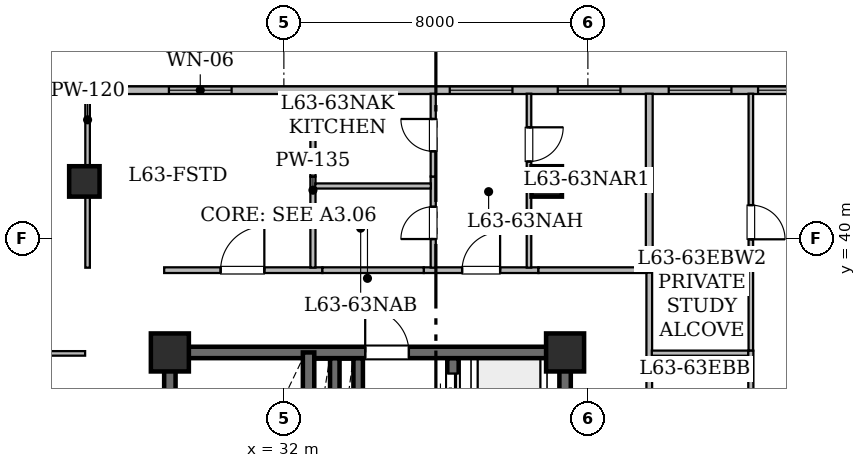
"""IFC4 building model, lengths in metres.
Left out: names, types, materials, properties, quantities, classifications, styles, units other than length and angle.
Written with IfcOpenShell. Run it as: python <this file> out.ifc"""

import sys

from ifc_helpers import new_model, si_unit, direction, frame, frame_2d, origin, origin_2d, place, context, subcontext, project, spatial, rectangle, hollow_rectangle, extrude, element, fill, save


model = new_model("IFC4")
c1 = context("Model", 3, precision=1e-05, world=origin(), true_north=direction((0.0, 1.0)))
c2 = subcontext(c1, "Body", "Model", "MODEL_VIEW")
j1 = project(units=[si_unit("LENGTHUNIT", "METRE"), si_unit("PLANEANGLEUNIT", "RADIAN")], contexts=[c1])
p1 = place(None, origin())
s1 = spatial("IfcSite", under=j1, at=p1, CompositionType="ELEMENT")
p2 = place(p1, origin())
s2 = spatial("IfcBuilding", under=s1, at=p2, CompositionType="ELEMENT")
p3 = place(p2, frame((0.0, 0.0, 246.4)))
s3 = spatial("IfcBuildingStorey", under=s2, at=p3, CompositionType="ELEMENT", Elevation=246.4)
for number, where, z_axis, x_axis in (
    (1, (29.0, 37.0, 0.0), (0.0, 0.0, 1.0), (1.0, 0.0, 0.0)),
    (2, (39.4, 37.0, 0.0), (0.0, 0.0, 1.0), (1.0, 0.0, 0.0)),
):
    element("IfcColumn", number, at=place(p3, frame(where, z_axis=z_axis, x_axis=x_axis)), inside=s3, PredefinedType="COLUMN", context=c2, shape_type="SweptSolid", body=[
        extrude(hollow_rectangle(XDim=1.0, YDim=1.0, WallThickness=0.05, at=origin_2d()), origin(), (0.0, 0.0, 1.0), 3.65),
    ])
for number, where, z_axis, x_axis in (
    (3, (26.75, 41.5, 0.0), (0.0, 0.0, 1.0), (1.0, 0.0, 0.0)),
    (4, (38.917, 41.5, 0.0), (0.0, 0.0, 1.0), (1.0, 0.0, 0.0)),
):
    element("IfcColumn", number, at=place(p3, frame(where, z_axis=z_axis, x_axis=x_axis)), inside=s3, PredefinedType="COLUMN", context=c2, shape_type="SweptSolid", body=[
        extrude(hollow_rectangle(XDim=0.8, YDim=0.8, WallThickness=0.04, at=origin_2d()), origin(), (0.0, 0.0, 1.0), 3.65),
    ])
p4 = place(p3, frame((24.302, 43.9, 0.0), z_axis=(0.0, 0.0, 1.0), x_axis=(1.0, 0.0, 0.0)))
e5 = element("IfcWall", 5, at=p4, inside=s3, PredefinedType="STANDARD", context=c2, shape_type="SweptSolid", body=[
    extrude(rectangle(XDim=41.457, YDim=0.2, at=frame_2d((20.729, 0.0))), origin(), (0.0, 0.0, 1.0), 3.43),
])
p5 = place(p4, frame((4.673, 0.0, 0.85)))
e6 = element("IfcOpeningElement", 6, at=p5, cuts=e5, PredefinedType="OPENING", context=c2, shape_type="SweptSolid", body=[
    extrude(rectangle(XDim=1.65, YDim=1.55, at=frame_2d((0.825, 0.775))), frame((0.0, 0.11, 0.0), z_axis=(0.0, -1.0, 0.0), x_axis=(1.0, 0.0, 0.0)), (0.0, 0.0, 1.0), 0.22),
])
p6 = place(p4, frame((12.063, 0.0, 0.85)))
e7 = element("IfcOpeningElement", 7, at=p6, cuts=e5, PredefinedType="OPENING", context=c2, shape_type="SweptSolid", body=[
    extrude(rectangle(XDim=1.65, YDim=1.55, at=frame_2d((0.825, 0.775))), frame((0.0, 0.11, 0.0), z_axis=(0.0, -1.0, 0.0), x_axis=(1.0, 0.0, 0.0)), (0.0, 0.0, 1.0), 0.22),
])
p7 = place(p4, frame((14.905, 0.0, 0.85)))
e8 = element("IfcOpeningElement", 8, at=p7, cuts=e5, PredefinedType="OPENING", context=c2, shape_type="SweptSolid", body=[
    extrude(rectangle(XDim=1.65, YDim=1.55, at=frame_2d((0.825, 0.775))), frame((0.0, 0.11, 0.0), z_axis=(0.0, -1.0, 0.0), x_axis=(1.0, 0.0, 0.0)), (0.0, 0.0, 1.0), 0.22),
])
p8 = place(p4, frame((17.825, 0.0, 0.85)))
e9 = element("IfcOpeningElement", 9, at=p8, cuts=e5, PredefinedType="OPENING", context=c2, shape_type="SweptSolid", body=[
    extrude(rectangle(XDim=1.65, YDim=1.55, at=frame_2d((0.825, 0.775))), frame((0.0, 0.11, 0.0), z_axis=(0.0, -1.0, 0.0), x_axis=(1.0, 0.0, 0.0)), (0.0, 0.0, 1.0), 0.22),
])
p9 = place(p4, frame((20.176, 0.0, 0.8)))
e10 = element("IfcOpeningElement", 10, at=p9, cuts=e5, PredefinedType="OPENING", context=c2, shape_type="SweptSolid", body=[
    extrude(rectangle(XDim=1.2, YDim=1.5, at=frame_2d((0.6, 0.75))), frame((0.0, 0.11, 0.0), z_axis=(0.0, -1.0, 0.0), x_axis=(1.0, 0.0, 0.0)), (0.0, 0.0, 1.0), 0.22),
])
p10 = place(p4, frame((22.605, 0.0, 0.85)))
e11 = element("IfcOpeningElement", 11, at=p10, cuts=e5, PredefinedType="OPENING", context=c2, shape_type="SweptSolid", body=[
    extrude(rectangle(XDim=1.65, YDim=1.55, at=frame_2d((0.825, 0.775))), frame((0.0, 0.11, 0.0), z_axis=(0.0, -1.0, 0.0), x_axis=(1.0, 0.0, 0.0)), (0.0, 0.0, 1.0), 0.22),
])
p11 = place(p4, frame((26.664, 0.0, 0.85)))
e12 = element("IfcOpeningElement", 12, at=p11, cuts=e5, PredefinedType="OPENING", context=c2, shape_type="SweptSolid", body=[
    extrude(rectangle(XDim=1.65, YDim=1.55, at=frame_2d((0.825, 0.775))), frame((0.0, 0.11, 0.0), z_axis=(0.0, -1.0, 0.0), x_axis=(1.0, 0.0, 0.0)), (0.0, 0.0, 1.0), 0.22),
])
p12 = place(p4, frame((32.408, 0.0, 0.85)))
e13 = element("IfcOpeningElement", 13, at=p12, cuts=e5, PredefinedType="OPENING", context=c2, shape_type="SweptSolid", body=[
    extrude(rectangle(XDim=1.65, YDim=1.55, at=frame_2d((0.825, 0.775))), frame((0.0, 0.11, 0.0), z_axis=(0.0, -1.0, 0.0), x_axis=(1.0, 0.0, 0.0)), (0.0, 0.0, 1.0), 0.22),
])
p13 = place(p4, frame((38.688, 0.0, 0.85)))
e14 = element("IfcOpeningElement", 14, at=p13, cuts=e5, PredefinedType="OPENING", context=c2, shape_type="SweptSolid", body=[
    extrude(rectangle(XDim=1.65, YDim=1.55, at=frame_2d((0.825, 0.775))), frame((0.0, 0.11, 0.0), z_axis=(0.0, -1.0, 0.0), x_axis=(1.0, 0.0, 0.0)), (0.0, 0.0, 1.0), 0.22),
])
p14 = place(p3, frame((29.0, 28.0, 0.0), z_axis=(0.0, 0.0, 1.0), x_axis=(0.0, 1.0, 0.0)))
e15 = element("IfcWall", 15, at=p14, inside=s3, PredefinedType="SHEAR", context=c2, shape_type="SweptSolid", body=[
    extrude(rectangle(XDim=9.0, YDim=0.3, at=frame_2d((4.5, 0.0))), origin(), (0.0, 0.0, 1.0), 3.43),
])
p15 = place(p3, frame((29.0, 37.0, 0.0), z_axis=(0.0, 0.0, 1.0), x_axis=(1.0, 0.0, 0.0)))
e16 = element("IfcWall", 16, at=p15, inside=s3, PredefinedType="SHEAR", context=c2, shape_type="SweptSolid", body=[
    extrude(rectangle(XDim=10.4, YDim=0.3, at=frame_2d((5.2, 0.0))), origin(), (0.0, 0.0, 1.0), 3.43),
])
p16 = place(p15, frame((5.14, 0.0, 0.0)))
e17 = element("IfcOpeningElement", 17, at=p16, cuts=e16, PredefinedType="OPENING", context=c2, shape_type="SweptSolid", body=[
    extrude(rectangle(XDim=1.15, YDim=2.2, at=frame_2d((0.575, 1.1))), frame((0.0, 0.16, 0.0), z_axis=(0.0, -1.0, 0.0), x_axis=(1.0, 0.0, 0.0)), (0.0, 0.0, 1.0), 0.32),
])
p17 = place(p3, frame((39.4, 24.4, 0.0), z_axis=(0.0, 0.0, 1.0), x_axis=(0.0, 1.0, 0.0)))
e18 = element("IfcWall", 18, at=p17, inside=s3, PredefinedType="SHEAR", context=c2, shape_type="SweptSolid", body=[
    extrude(rectangle(XDim=12.6, YDim=0.3, at=frame_2d((6.3, 0.0))), origin(), (0.0, 0.0, 1.0), 3.43),
])
p18 = place(p3, frame((32.65, 28.0, 0.0), z_axis=(0.0, 0.0, 1.0), x_axis=(0.0, 1.0, 0.0)))
e19 = element("IfcWall", 19, at=p18, inside=s3, PredefinedType="SHEAR", context=c2, shape_type="SweptSolid", body=[
    extrude(rectangle(XDim=9.0, YDim=0.3, at=frame_2d((4.5, 0.0))), origin(), (0.0, 0.0, 1.0), 3.43),
])
p19 = place(p18, frame((0.72, 0.0, 0.0)))
e20 = element("IfcOpeningElement", 20, at=p19, cuts=e19, PredefinedType="OPENING", context=c2, shape_type="SweptSolid", body=[
    extrude(rectangle(XDim=1.0, YDim=2.15, at=frame_2d((0.5, 1.075))), frame((0.0, 0.16, 0.0), z_axis=(0.0, -1.0, 0.0), x_axis=(1.0, 0.0, 0.0)), (0.0, 0.0, 1.0), 0.32),
])
p20 = place(p3, frame((36.45, 31.25, 0.0), z_axis=(0.0, 0.0, 1.0), x_axis=(0.0, 1.0, 0.0)))
e21 = element("IfcWall", 21, at=p20, inside=s3, PredefinedType="SHEAR", context=c2, shape_type="SweptSolid", body=[
    extrude(rectangle(XDim=5.596, YDim=0.3, at=frame_2d((2.798, 0.0))), origin(), (0.0, 0.0, 1.0), 3.43),
])
p21 = place(p20, frame((0.12, 0.0, 0.0)))
e22 = element("IfcOpeningElement", 22, at=p21, cuts=e21, PredefinedType="OPENING", context=c2, shape_type="SweptSolid", body=[
    extrude(rectangle(XDim=1.05, YDim=2.15, at=frame_2d((0.525, 1.075))), frame((0.0, 0.16, 0.0), z_axis=(0.0, -1.0, 0.0), x_axis=(1.0, 0.0, 0.0)), (0.0, 0.0, 1.0), 0.32),
])
p22 = place(p20, frame((2.125, 0.0, 0.0)))
e23 = element("IfcOpeningElement", 23, at=p22, cuts=e21, PredefinedType="OPENING", context=c2, shape_type="SweptSolid", body=[
    extrude(rectangle(XDim=1.05, YDim=2.15, at=frame_2d((0.525, 1.075))), frame((0.0, 0.16, 0.0), z_axis=(0.0, -1.0, 0.0), x_axis=(1.0, 0.0, 0.0)), (0.0, 0.0, 1.0), 0.32),
])
p23 = place(p20, frame((4.145, 0.0, 0.0)))
e24 = element("IfcOpeningElement", 24, at=p23, cuts=e21, PredefinedType="OPENING", context=c2, shape_type="SweptSolid", body=[
    extrude(rectangle(XDim=1.05, YDim=2.15, at=frame_2d((0.525, 1.075))), frame((0.0, 0.16, 0.0), z_axis=(0.0, -1.0, 0.0), x_axis=(1.0, 0.0, 0.0)), (0.0, 0.0, 1.0), 0.32),
])
p24 = place(p3, frame((33.955, 34.025, 0.0), z_axis=(0.0, 0.0, 1.0), x_axis=(0.0, 1.0, 0.0)))
e25 = element("IfcWall", 25, at=p24, inside=s3, PredefinedType="SHEAR", context=c2, shape_type="SweptSolid", body=[
    extrude(rectangle(XDim=2.821, YDim=0.25, at=frame_2d((1.411, 0.0))), origin(), (0.0, 0.0, 1.0), 3.43),
])
p25 = place(p3, frame((33.34, 34.279, 0.0), z_axis=(0.0, 0.0, 1.0), x_axis=(0.0, 1.0, 0.0)))
e26 = element("IfcWall", 26, at=p25, inside=s3, PredefinedType="SHEAR", context=c2, shape_type="SweptSolid", body=[
    extrude(rectangle(XDim=2.567, YDim=0.25, at=frame_2d((1.283, 0.0))), origin(), (0.0, 0.0, 1.0), 3.43),
])
p26 = place(p3, frame((28.85, 39.165, 0.0), z_axis=(0.0, 0.0, 1.0), x_axis=(1.0, 0.0, 0.0)))
e27 = element("IfcWall", 27, at=p26, inside=s3, PredefinedType="STANDARD", context=c2, shape_type="SweptSolid", body=[
    extrude(rectangle(XDim=4.164, YDim=0.15, at=frame_2d((2.082, 0.0))), origin(), (0.0, 0.0, 1.0), 3.43),
])
p27 = place(p26, frame((1.486, 0.0, 0.0)))
e28 = element("IfcOpeningElement", 28, at=p27, cuts=e27, PredefinedType="OPENING", context=c2, shape_type="SweptSolid", body=[
    extrude(rectangle(XDim=1.15, YDim=2.2, at=frame_2d((0.575, 1.1))), frame((0.0, 0.085, 0.0), z_axis=(0.0, -1.0, 0.0), x_axis=(1.0, 0.0, 0.0)), (0.0, 0.0, 1.0), 0.17),
])
p28 = place(p3, frame((35.681, 39.165, 0.0), z_axis=(0.0, 0.0, 1.0), x_axis=(1.0, 0.0, 0.0)))
e29 = element("IfcWall", 29, at=p28, inside=s3, PredefinedType="STANDARD", context=c2, shape_type="SweptSolid", body=[
    extrude(rectangle(XDim=3.018, YDim=0.15, at=frame_2d((1.509, 0.0))), origin(), (0.0, 0.0, 1.0), 3.43),
])
p29 = place(p28, frame((1.009, 0.0, 0.0)))
e30 = element("IfcOpeningElement", 30, at=p29, cuts=e29, PredefinedType="OPENING", context=c2, shape_type="SweptSolid", body=[
    extrude(rectangle(XDim=1.0, YDim=2.15, at=frame_2d((0.5, 1.075))), frame((0.0, 0.085, 0.0), z_axis=(0.0, -1.0, 0.0), x_axis=(1.0, 0.0, 0.0)), (0.0, 0.0, 1.0), 0.17),
])
p30 = place(p3, frame((33.014, 39.165, 0.0), z_axis=(0.0, 0.0, 1.0), x_axis=(1.0, 0.0, 0.0)))
e31 = element("IfcWall", 31, at=p30, inside=s3, PredefinedType="STANDARD", context=c2, shape_type="SweptSolid", body=[
    extrude(rectangle(XDim=2.667, YDim=0.15, at=frame_2d((1.333, 0.0))), origin(), (0.0, 0.0, 1.0), 3.43),
])
p31 = place(p3, frame((38.699, 39.165, 0.0), z_axis=(0.0, 0.0, 1.0), x_axis=(1.0, 0.0, 0.0)))
e32 = element("IfcWall", 32, at=p31, inside=s3, PredefinedType="STANDARD", context=c2, shape_type="SweptSolid", body=[
    extrude(rectangle(XDim=2.851, YDim=0.15, at=frame_2d((1.426, 0.0))), origin(), (0.0, 0.0, 1.0), 2.725),
])
p32 = place(p3, frame((41.615, 39.1, 0.0), z_axis=(0.0, 0.0, 1.0), x_axis=(0.0, -1.0, 0.0)))
e33 = element("IfcWall", 33, at=p32, inside=s3, PredefinedType="STANDARD", context=c2, shape_type="SweptSolid", body=[
    extrude(rectangle(XDim=2.368, YDim=0.15, at=frame_2d((1.184, 0.0))), origin(), (0.0, 0.0, 1.0), 2.725),
])
p33 = place(p3, frame((41.615, 36.732, 0.0), z_axis=(0.0, 0.0, 1.0), x_axis=(0.0, -1.0, 0.0)))
e34 = element("IfcWall", 34, at=p33, inside=s3, PredefinedType="STANDARD", context=c2, shape_type="SweptSolid", body=[
    extrude(rectangle(XDim=4.467, YDim=0.15, at=frame_2d((2.233, 0.0))), origin(), (0.0, 0.0, 1.0), 2.957),
])
p34 = place(p3, frame((26.835, 39.23, 0.0), z_axis=(0.0, 0.0, 1.0), x_axis=(0.0, 1.0, 0.0)))
e35 = element("IfcWall", 35, at=p34, inside=s3, PredefinedType="PARTITIONING", context=c2, shape_type="SweptSolid", body=[
    extrude(rectangle(XDim=4.578, YDim=0.12, at=frame_2d((2.289, 0.0))), origin(), (0.0, 0.0, 1.0), 2.725),
])
p35 = place(p3, frame((32.765, 41.629, 0.0), z_axis=(0.0, 0.0, 1.0), x_axis=(0.0, -1.0, 0.0)))
e36 = element("IfcWall", 36, at=p35, inside=s3, PredefinedType="PARTITIONING", context=c2, shape_type="SweptSolid", body=[
    extrude(rectangle(XDim=2.397, YDim=0.135, at=frame_2d((1.198, 0.0))), origin(), (0.0, 0.0, 1.0), 2.887),
])
p36 = place(p3, frame((32.765, 43.808, 0.0), z_axis=(0.0, 0.0, 1.0), x_axis=(0.0, -1.0, 0.0)))
e37 = element("IfcWall", 37, at=p36, inside=s3, PredefinedType="PARTITIONING", context=c2, shape_type="SweptSolid", body=[
    extrude(rectangle(XDim=2.179, YDim=0.135, at=frame_2d((1.09, 0.0))), origin(), (0.0, 0.0, 1.0), 3.43),
])
p37 = place(p3, frame((20.392, 36.975, 0.0), z_axis=(0.0, 0.0, 1.0), x_axis=(1.0, 0.0, 0.0)))
e38 = element("IfcWall", 38, at=p37, inside=s3, PredefinedType="PARTITIONING", context=c2, shape_type="SweptSolid", body=[
    extrude(rectangle(XDim=6.378, YDim=0.12, at=frame_2d((3.189, 0.0))), origin(), (0.0, 0.0, 1.0), 2.887),
])
p38 = place(p37, frame((2.739, 0.0, 0.0)))
e39 = element("IfcOpeningElement", 39, at=p38, cuts=e38, PredefinedType="OPENING", context=c2, shape_type="SweptSolid", body=[
    extrude(rectangle(XDim=0.9, YDim=2.1, at=frame_2d((0.45, 1.05))), frame((0.0, 0.07, 0.0), z_axis=(0.0, -1.0, 0.0), x_axis=(1.0, 0.0, 0.0)), (0.0, 0.0, 1.0), 0.14),
])
p39 = place(p3, frame((35.93, 39.232, 0.0), z_axis=(0.0, 0.0, 1.0), x_axis=(0.0, 1.0, 0.0)))
e40 = element("IfcWall", 40, at=p39, inside=s3, PredefinedType="PARTITIONING", context=c2, shape_type="SweptSolid", body=[
    extrude(rectangle(XDim=2.397, YDim=0.135, at=frame_2d((1.198, 0.0))), origin(), (0.0, 0.0, 1.0), 2.887),
])
p40 = place(p39, frame((0.752, 0.0, 0.0)))
e41 = element("IfcOpeningElement", 41, at=p40, cuts=e40, PredefinedType="OPENING", context=c2, shape_type="SweptSolid", body=[
    extrude(rectangle(XDim=0.85, YDim=2.1, at=frame_2d((0.425, 1.05))), frame((0.0, 0.077, 0.0), z_axis=(0.0, -1.0, 0.0), x_axis=(1.0, 0.0, 0.0)), (0.0, 0.0, 1.0), 0.155),
])
p41 = place(p3, frame((35.93, 41.629, 0.0), z_axis=(0.0, 0.0, 1.0), x_axis=(0.0, 1.0, 0.0)))
e42 = element("IfcWall", 42, at=p41, inside=s3, PredefinedType="PARTITIONING", context=c2, shape_type="SweptSolid", body=[
    extrude(rectangle(XDim=2.179, YDim=0.135, at=frame_2d((1.09, 0.0))), origin(), (0.0, 0.0, 1.0), 3.43),
])
p42 = place(p41, frame((0.664, 0.0, 0.0)))
e43 = element("IfcOpeningElement", 43, at=p42, cuts=e42, PredefinedType="OPENING", context=c2, shape_type="SweptSolid", body=[
    extrude(rectangle(XDim=0.85, YDim=2.1, at=frame_2d((0.425, 1.05))), frame((0.0, 0.077, 0.0), z_axis=(0.0, -1.0, 0.0), x_axis=(1.0, 0.0, 0.0)), (0.0, 0.0, 1.0), 0.155),
])
p43 = place(p3, frame((38.45, 43.808, 0.0), z_axis=(0.0, 0.0, 1.0), x_axis=(0.0, -1.0, 0.0)))
e44 = element("IfcWall", 44, at=p43, inside=s3, PredefinedType="PARTITIONING", context=c2, shape_type="SweptSolid", body=[
    extrude(rectangle(XDim=4.576, YDim=0.12, at=frame_2d((2.288, 0.0))), origin(), (0.0, 0.0, 1.0), 2.887),
])
p44 = place(p43, frame((0.884, 0.0, 0.0)))
e45 = element("IfcOpeningElement", 45, at=p44, cuts=e44, PredefinedType="OPENING", context=c2, shape_type="SweptSolid", body=[
    extrude(rectangle(XDim=0.9, YDim=2.1, at=frame_2d((0.45, 1.05))), frame((0.0, 0.07, 0.0), z_axis=(0.0, -1.0, 0.0), x_axis=(1.0, 0.0, 0.0)), (0.0, 0.0, 1.0), 0.14),
])
p45 = place(p3, frame((32.827, 41.38, 0.0), z_axis=(0.0, 0.0, 1.0), x_axis=(1.0, 0.0, 0.0)))
e46 = element("IfcWall", 46, at=p45, inside=s3, PredefinedType="PARTITIONING", context=c2, shape_type="SweptSolid", body=[
    extrude(rectangle(XDim=3.041, YDim=0.135, at=frame_2d((1.521, 0.0))), origin(), (0.0, 0.0, 1.0), 2.887),
])
p46 = place(p3, frame((41.615, 43.808, 0.0), z_axis=(0.0, 0.0, 1.0), x_axis=(0.0, -1.0, 0.0)))
e47 = element("IfcWall", 47, at=p46, inside=s3, PredefinedType="STANDARD", context=c2, shape_type="SweptSolid", body=[
    extrude(rectangle(XDim=4.578, YDim=0.18, at=frame_2d((2.289, 0.0))), origin(), (0.0, 0.0, 1.0), 2.887),
])
p47 = place(p3, frame((44.288, 43.808, 0.0), z_axis=(0.0, 0.0, 1.0), x_axis=(0.0, -1.0, 0.0)))
e48 = element("IfcWall", 48, at=p47, inside=s3, PredefinedType="PARTITIONING", context=c2, shape_type="SweptSolid", body=[
    extrude(rectangle(XDim=6.762, YDim=0.12, at=frame_2d((3.381, 0.0))), origin(), (0.0, 0.0, 1.0), 2.725),
])
p48 = place(p47, frame((2.931, 0.0, 0.0)))
e49 = element("IfcOpeningElement", 49, at=p48, cuts=e48, PredefinedType="OPENING", context=c2, shape_type="SweptSolid", body=[
    extrude(rectangle(XDim=0.9, YDim=2.1, at=frame_2d((0.45, 1.05))), frame((0.0, 0.07, 0.0), z_axis=(0.0, -1.0, 0.0), x_axis=(1.0, 0.0, 0.0)), (0.0, 0.0, 1.0), 0.14),
])
p49 = place(p3, frame((44.223, 36.981, 0.0), z_axis=(0.0, 0.0, 1.0), x_axis=(-1.0, 0.0, 0.0)))
e50 = element("IfcWall", 50, at=p49, inside=s3, PredefinedType="PARTITIONING", context=c2, shape_type="SweptSolid", body=[
    extrude(rectangle(XDim=2.541, YDim=0.135, at=frame_2d((1.271, 0.0))), origin(), (0.0, 0.0, 1.0), 2.725),
])
p50 = place(p3, frame((44.288, 31.951, 0.0), z_axis=(0.0, 0.0, 1.0), x_axis=(0.0, 1.0, 0.0)))
e51 = element("IfcWall", 51, at=p50, inside=s3, PredefinedType="PARTITIONING", context=c2, shape_type="SweptSolid", body=[
    extrude(rectangle(XDim=5.095, YDim=0.135, at=frame_2d((2.547, 0.0))), origin(), (0.0, 0.0, 1.0), 2.957),
])
p51 = place(p50, frame((2.123, 0.0, 0.0)))
e52 = element("IfcOpeningElement", 52, at=p51, cuts=e51, PredefinedType="OPENING", context=c2, shape_type="SweptSolid", body=[
    extrude(rectangle(XDim=0.85, YDim=2.1, at=frame_2d((0.425, 1.05))), frame((0.0, 0.077, 0.0), z_axis=(0.0, -1.0, 0.0), x_axis=(1.0, 0.0, 0.0)), (0.0, 0.0, 1.0), 0.155),
])
p52 = place(p5, origin())
e53 = element("IfcWindow", 53, at=p52, inside=s3, PartitioningType="SINGLE_PANEL", PredefinedType="WINDOW", context=c2, shape_type="SweptSolid", body=[
    extrude(rectangle(XDim=1.65, YDim=1.55, at=frame_2d((0.825, 0.775))), frame((0.0, 0.03, 0.0), z_axis=(0.0, -1.0, 0.0), x_axis=(1.0, 0.0, 0.0)), (0.0, 0.0, 1.0), 0.06),
])
fill(e6, e53)
p53 = place(p6, origin())
e54 = element("IfcWindow", 54, at=p53, inside=s3, PartitioningType="SINGLE_PANEL", PredefinedType="WINDOW", context=c2, shape_type="SweptSolid", body=[
    extrude(rectangle(XDim=1.65, YDim=1.55, at=frame_2d((0.825, 0.775))), frame((0.0, 0.03, 0.0), z_axis=(0.0, -1.0, 0.0), x_axis=(1.0, 0.0, 0.0)), (0.0, 0.0, 1.0), 0.06),
])
fill(e7, e54)
p54 = place(p7, origin())
e55 = element("IfcWindow", 55, at=p54, inside=s3, PartitioningType="SINGLE_PANEL", PredefinedType="WINDOW", context=c2, shape_type="SweptSolid", body=[
    extrude(rectangle(XDim=1.65, YDim=1.55, at=frame_2d((0.825, 0.775))), frame((0.0, 0.03, 0.0), z_axis=(0.0, -1.0, 0.0), x_axis=(1.0, 0.0, 0.0)), (0.0, 0.0, 1.0), 0.06),
])
fill(e8, e55)
p55 = place(p8, origin())
e56 = element("IfcWindow", 56, at=p55, inside=s3, PartitioningType="SINGLE_PANEL", PredefinedType="WINDOW", context=c2, shape_type="SweptSolid", body=[
    extrude(rectangle(XDim=1.65, YDim=1.55, at=frame_2d((0.825, 0.775))), frame((0.0, 0.03, 0.0), z_axis=(0.0, -1.0, 0.0), x_axis=(1.0, 0.0, 0.0)), (0.0, 0.0, 1.0), 0.06),
])
fill(e9, e56)
p56 = place(p9, origin())
e57 = element("IfcWindow", 57, at=p56, inside=s3, PartitioningType="SINGLE_PANEL", PredefinedType="WINDOW", context=c2, shape_type="SweptSolid", body=[
    extrude(rectangle(XDim=1.2, YDim=1.5, at=frame_2d((0.6, 0.75))), frame((0.0, 0.03, 0.0), z_axis=(0.0, -1.0, 0.0), x_axis=(1.0, 0.0, 0.0)), (0.0, 0.0, 1.0), 0.06),
])
fill(e10, e57)
p57 = place(p16, origin())
e58 = element("IfcDoor", 58, at=p57, inside=s3, OperationType="SINGLE_SWING_LEFT", PredefinedType="DOOR", context=c2, shape_type="SweptSolid", body=[
    extrude(rectangle(XDim=1.15, YDim=2.2, at=frame_2d((0.575, 1.1))), frame((0.0, 0.025, 0.0), z_axis=(0.0, -1.0, 0.0), x_axis=(1.0, 0.0, 0.0)), (0.0, 0.0, 1.0), 0.05),
])
fill(e17, e58)
p58 = place(p23, origin())
e59 = element("IfcDoor", 59, at=p58, inside=s3, OperationType="SLIDING_TO_LEFT", PredefinedType="DOOR", context=c2, shape_type="SweptSolid", body=[
    extrude(rectangle(XDim=1.05, YDim=2.15, at=frame_2d((0.525, 1.075))), frame((0.0, 0.025, 0.0), z_axis=(0.0, -1.0, 0.0), x_axis=(1.0, 0.0, 0.0)), (0.0, 0.0, 1.0), 0.05),
])
fill(e24, e59)
p59 = place(p27, origin())
e60 = element("IfcDoor", 60, at=p59, inside=s3, OperationType="SINGLE_SWING_RIGHT", PredefinedType="DOOR", context=c2, shape_type="SweptSolid", body=[
    extrude(rectangle(XDim=1.15, YDim=2.2, at=frame_2d((0.575, 1.1))), frame((0.0, 0.025, 0.0), z_axis=(0.0, -1.0, 0.0), x_axis=(1.0, 0.0, 0.0)), (0.0, 0.0, 1.0), 0.05),
])
fill(e28, e60)
p60 = place(p29, origin())
e61 = element("IfcDoor", 61, at=p60, inside=s3, OperationType="SINGLE_SWING_RIGHT", PredefinedType="DOOR", context=c2, shape_type="SweptSolid", body=[
    extrude(rectangle(XDim=1.0, YDim=2.15, at=frame_2d((0.5, 1.075))), frame((0.0, 0.025, 0.0), z_axis=(0.0, -1.0, 0.0), x_axis=(1.0, 0.0, 0.0)), (0.0, 0.0, 1.0), 0.05),
])
fill(e30, e61)
p61 = place(p40, origin())
e62 = element("IfcDoor", 62, at=p61, inside=s3, OperationType="SINGLE_SWING_LEFT", PredefinedType="DOOR", context=c2, shape_type="SweptSolid", body=[
    extrude(rectangle(XDim=0.85, YDim=2.1, at=frame_2d((0.425, 1.05))), frame((0.0, 0.025, 0.0), z_axis=(0.0, -1.0, 0.0), x_axis=(1.0, 0.0, 0.0)), (0.0, 0.0, 1.0), 0.05),
])
fill(e41, e62)
p62 = place(p42, origin())
e63 = element("IfcDoor", 63, at=p62, inside=s3, OperationType="SINGLE_SWING_RIGHT", PredefinedType="DOOR", context=c2, shape_type="SweptSolid", body=[
    extrude(rectangle(XDim=0.85, YDim=2.1, at=frame_2d((0.425, 1.05))), frame((0.0, 0.025, 0.0), z_axis=(0.0, -1.0, 0.0), x_axis=(1.0, 0.0, 0.0)), (0.0, 0.0, 1.0), 0.05),
])
fill(e43, e63)
p63 = place(p44, origin())
e64 = element("IfcDoor", 64, at=p63, inside=s3, OperationType="SINGLE_SWING_LEFT", PredefinedType="DOOR", context=c2, shape_type="SweptSolid", body=[
    extrude(rectangle(XDim=0.9, YDim=2.1, at=frame_2d((0.45, 1.05))), frame((0.0, 0.025, 0.0), z_axis=(0.0, -1.0, 0.0), x_axis=(1.0, 0.0, 0.0)), (0.0, 0.0, 1.0), 0.05),
])
fill(e45, e64)
p64 = place(p48, origin())
e65 = element("IfcDoor", 65, at=p64, inside=s3, OperationType="SINGLE_SWING_RIGHT", PredefinedType="DOOR", context=c2, shape_type="SweptSolid", body=[
    extrude(rectangle(XDim=0.9, YDim=2.1, at=frame_2d((0.45, 1.05))), frame((0.0, 0.025, 0.0), z_axis=(0.0, -1.0, 0.0), x_axis=(1.0, 0.0, 0.0)), (0.0, 0.0, 1.0), 0.05),
])
fill(e49, e65)
save(model, sys.argv[1])
